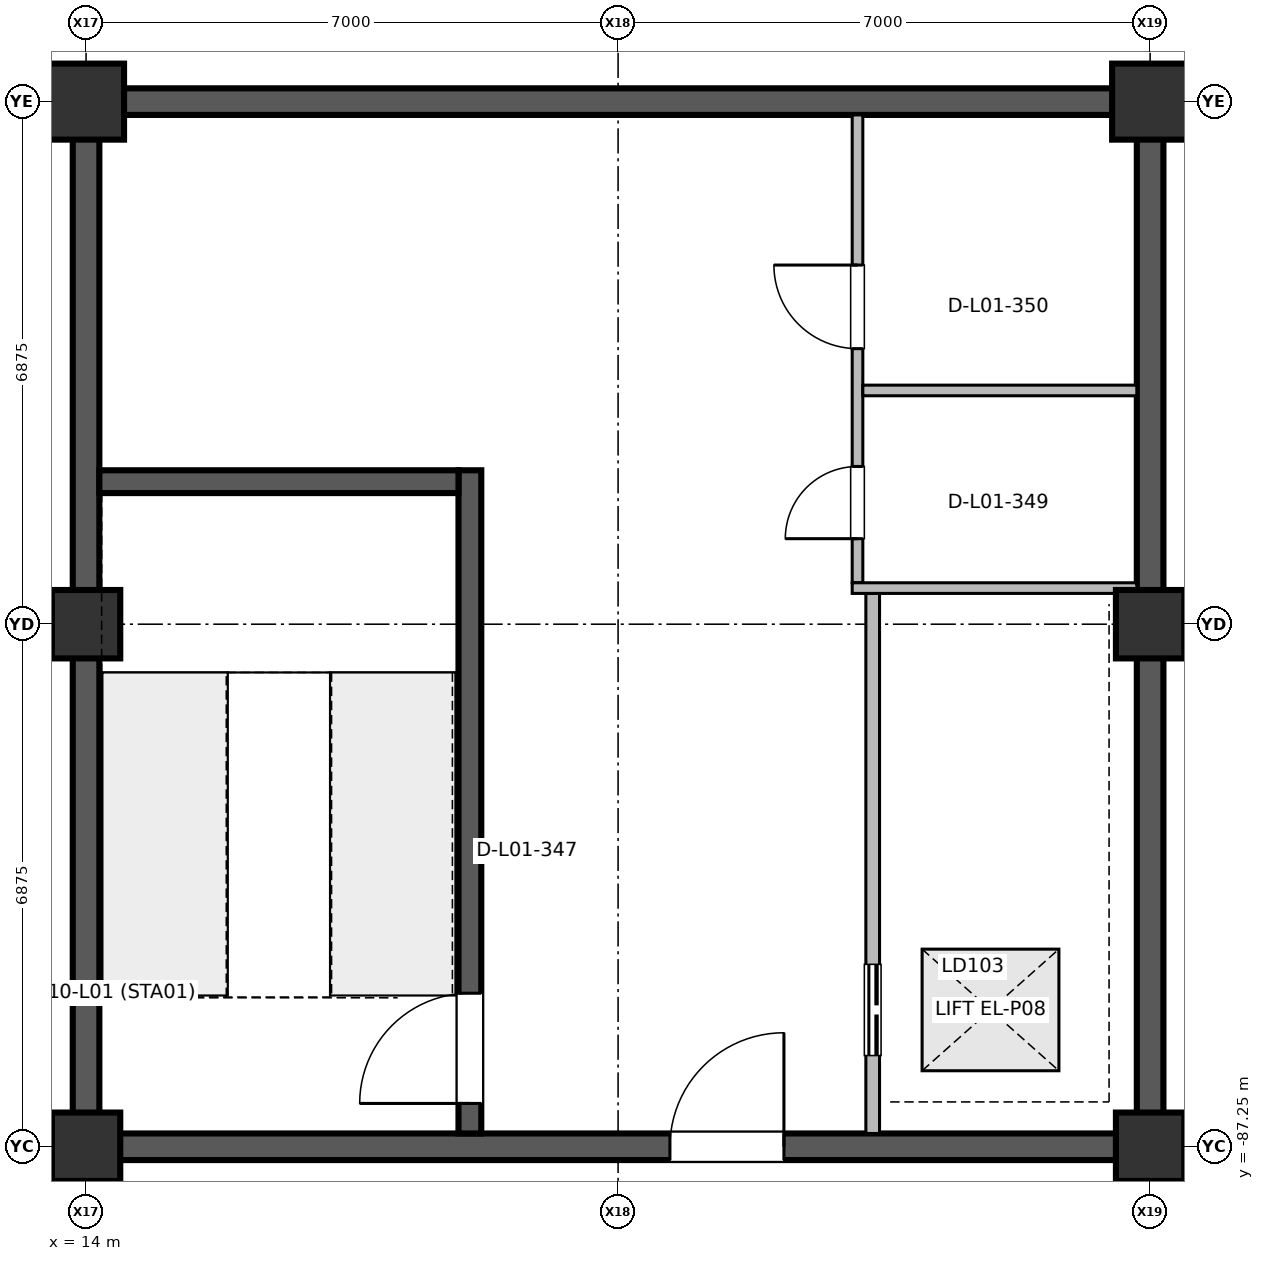
"""IFC4 building model, lengths in metres.
Left out: names, types, materials, properties, quantities, classifications, styles, units other than length and angle.
Written with IfcOpenShell. Run it as: python <this file> out.ifc"""

import sys

from ifc_helpers import new_model, si_unit, direction, frame, frame_2d, origin, origin_2d, place, context, subcontext, project, spatial, rectangle, extrude, element, fill, save


model = new_model("IFC4")
c1 = context("Model", 3, precision=1e-05, world=origin(), true_north=direction((0.0, 1.0)))
c2 = subcontext(c1, "Body", "Model", "MODEL_VIEW")
j1 = project(units=[si_unit("LENGTHUNIT", "METRE"), si_unit("PLANEANGLEUNIT", "RADIAN")], contexts=[c1])
p1 = place(None, origin())
s1 = spatial("IfcSite", under=j1, at=p1, CompositionType="ELEMENT")
p2 = place(p1, origin())
s2 = spatial("IfcBuilding", under=s1, at=p2, CompositionType="ELEMENT")
p3 = place(p2, origin())
s3 = spatial("IfcBuildingStorey", under=s2, at=p3, CompositionType="ELEMENT", Elevation=0.0)
for number, where, z_axis, x_axis in (
    (1, (14.0, -87.25, 0.0), (0.0, 0.0, 1.0), (1.0, 0.0, 0.0)),
    (2, (14.0, -80.375, 0.0), (0.0, 0.0, 1.0), (1.0, 0.0, 0.0)),
):
    element("IfcColumn", number, at=place(p3, frame(where, z_axis=z_axis, x_axis=x_axis)), inside=s3, PredefinedType="COLUMN", context=c2, shape_type="SweptSolid", body=[
        extrude(rectangle(XDim=0.9, YDim=0.9, at=origin_2d()), origin(), (0.0, 0.0, 1.0), 5.998),
    ])
p4 = place(p3, frame((14.0, -73.5, 0.0), z_axis=(0.0, 0.0, 1.0), x_axis=(1.0, 0.0, 0.0)))
e3 = element("IfcColumn", 3, at=p4, inside=s3, PredefinedType="COLUMN", context=c2, shape_type="SweptSolid", body=[
    extrude(rectangle(XDim=1.0, YDim=1.0, at=origin_2d()), origin(), (0.0, 0.0, 1.0), 5.998),
])
for number, where, z_axis, x_axis in (
    (4, (28.0, -87.25, 0.0), (0.0, 0.0, 1.0), (1.0, 0.0, 0.0)),
    (5, (28.0, -80.375, 0.0), (0.0, 0.0, 1.0), (1.0, 0.0, 0.0)),
):
    element("IfcColumn", number, at=place(p3, frame(where, z_axis=z_axis, x_axis=x_axis)), inside=s3, PredefinedType="COLUMN", context=c2, shape_type="SweptSolid", body=[
        extrude(rectangle(XDim=0.9, YDim=0.9, at=origin_2d()), origin(), (0.0, 0.0, 1.0), 5.998),
    ])
p5 = place(p3, frame((28.0, -73.5, 0.0), z_axis=(0.0, 0.0, 1.0), x_axis=(1.0, 0.0, 0.0)))
e6 = element("IfcColumn", 6, at=p5, inside=s3, PredefinedType="COLUMN", context=c2, shape_type="SweptSolid", body=[
    extrude(rectangle(XDim=1.0, YDim=1.0, at=origin_2d()), origin(), (0.0, 0.0, 1.0), 5.998),
])
for number, where, z_axis, x_axis in (
    (7, (14.0, -87.075, 0.0), (0.0, 0.0, 1.0), (0.0, 1.0, 0.0)),
    (8, (28.0, -87.075, 0.0), (0.0, 0.0, 1.0), (0.0, 1.0, 0.0)),
):
    element("IfcWall", number, at=place(p3, frame(where, z_axis=z_axis, x_axis=x_axis)), inside=s3, PredefinedType="SHEAR", context=c2, shape_type="SweptSolid", body=[
        extrude(rectangle(XDim=13.4, YDim=0.35, at=frame_2d((6.7, 0.0))), origin(), (0.0, 0.0, 1.0), 5.78),
    ])
p6 = place(p3, frame((14.175, -87.25, 0.0), z_axis=(0.0, 0.0, 1.0), x_axis=(1.0, 0.0, 0.0)))
e9 = element("IfcWall", 9, at=p6, inside=s3, PredefinedType="SHEAR", context=c2, shape_type="SweptSolid", body=[
    extrude(rectangle(XDim=13.65, YDim=0.35, at=frame_2d((6.825, 0.0))), origin(), (0.0, 0.0, 1.0), 5.78),
])
p7 = place(p6, frame((7.507, 0.0, 0.0)))
e10 = element("IfcOpeningElement", 10, at=p7, cuts=e9, PredefinedType="OPENING", context=c2, shape_type="SweptSolid", body=[
    extrude(rectangle(XDim=1.5, YDim=2.2, at=frame_2d((0.75, 1.1))), frame((0.0, 0.185, 0.0), z_axis=(0.0, -1.0, 0.0), x_axis=(1.0, 0.0, 0.0)), (0.0, 0.0, 1.0), 0.37),
])
p8 = place(p3, frame((14.175, -73.5, 0.0), z_axis=(0.0, 0.0, 1.0), x_axis=(1.0, 0.0, 0.0)))
e11 = element("IfcWall", 11, at=p8, inside=s3, PredefinedType="SHEAR", context=c2, shape_type="SweptSolid", body=[
    extrude(rectangle(XDim=13.65, YDim=0.35, at=frame_2d((6.825, 0.0))), origin(), (0.0, 0.0, 1.0), 5.78),
])
p9 = place(p3, frame((19.05, -87.075, 0.0), z_axis=(0.0, 0.0, 1.0), x_axis=(0.0, 1.0, 0.0)))
e12 = element("IfcWall", 12, at=p9, inside=s3, PredefinedType="SHEAR", context=c2, shape_type="SweptSolid", body=[
    extrude(rectangle(XDim=8.725, YDim=0.3, at=frame_2d((4.362, 0.0))), origin(), (0.0, 0.0, 1.0), 5.78),
])
p10 = place(p9, frame((0.395, 0.0, 0.0)))
e13 = element("IfcOpeningElement", 13, at=p10, cuts=e12, PredefinedType="OPENING", context=c2, shape_type="SweptSolid", body=[
    extrude(rectangle(XDim=1.45, YDim=2.2, at=frame_2d((0.725, 1.1))), frame((0.0, 0.16, 0.0), z_axis=(0.0, -1.0, 0.0), x_axis=(1.0, 0.0, 0.0)), (0.0, 0.0, 1.0), 0.32),
])
p11 = place(p3, frame((24.35, -87.075, 0.0), z_axis=(0.0, 0.0, 1.0), x_axis=(0.0, 1.0, 0.0)))
e14 = element("IfcWall", 14, at=p11, inside=s3, PredefinedType="PARTITIONING", context=c2, shape_type="SweptSolid", body=[
    extrude(rectangle(XDim=7.105, YDim=0.18, at=frame_2d((3.552, 0.0))), origin(), (0.0, 0.0, 1.0), 5.02),
])
p12 = place(p11, frame((1.025, 0.0, 0.0)))
e15 = element("IfcOpeningElement", 15, at=p12, cuts=e14, PredefinedType="OPENING", context=c2, shape_type="SweptSolid", body=[
    extrude(rectangle(XDim=1.2, YDim=2.25, at=frame_2d((0.6, 1.125))), frame((0.0, 0.1, 0.0), z_axis=(0.0, -1.0, 0.0), x_axis=(1.0, 0.0, 0.0)), (0.0, 0.0, 1.0), 0.2),
])
p13 = place(p3, frame((24.15, -79.83, 0.0), z_axis=(0.0, 0.0, 1.0), x_axis=(0.0, 1.0, 0.0)))
e16 = element("IfcWall", 16, at=p13, inside=s3, PredefinedType="PARTITIONING", context=c2, shape_type="SweptSolid", body=[
    extrude(rectangle(XDim=6.155, YDim=0.14, at=frame_2d((3.078, 0.0))), origin(), (0.0, 0.0, 1.0), 5.02),
])
p14 = place(p13, frame((0.58, 0.0, 0.0)))
e17 = element("IfcOpeningElement", 17, at=p14, cuts=e16, PredefinedType="OPENING", context=c2, shape_type="SweptSolid", body=[
    extrude(rectangle(XDim=0.95, YDim=2.15, at=frame_2d((0.475, 1.075))), frame((0.0, 0.08, 0.0), z_axis=(0.0, -1.0, 0.0), x_axis=(1.0, 0.0, 0.0)), (0.0, 0.0, 1.0), 0.16),
])
p15 = place(p13, frame((3.08, 0.0, 0.0)))
e18 = element("IfcOpeningElement", 18, at=p15, cuts=e16, PredefinedType="OPENING", context=c2, shape_type="SweptSolid", body=[
    extrude(rectangle(XDim=1.1, YDim=2.15, at=frame_2d((0.55, 1.075))), frame((0.0, 0.08, 0.0), z_axis=(0.0, -1.0, 0.0), x_axis=(1.0, 0.0, 0.0)), (0.0, 0.0, 1.0), 0.16),
])
p16 = place(p3, frame((24.08, -79.9, 0.0), z_axis=(0.0, 0.0, 1.0), x_axis=(1.0, 0.0, 0.0)))
e19 = element("IfcWall", 19, at=p16, inside=s3, PredefinedType="PARTITIONING", context=c2, shape_type="SweptSolid", body=[
    extrude(rectangle(XDim=3.745, YDim=0.14, at=frame_2d((1.873, 0.0))), origin(), (0.0, 0.0, 1.0), 5.02),
])
p17 = place(p3, frame((24.22, -77.3, 0.0), z_axis=(0.0, 0.0, 1.0), x_axis=(1.0, 0.0, 0.0)))
e20 = element("IfcWall", 20, at=p17, inside=s3, PredefinedType="PARTITIONING", context=c2, shape_type="SweptSolid", body=[
    extrude(rectangle(XDim=3.605, YDim=0.14, at=frame_2d((1.802, 0.0))), origin(), (0.0, 0.0, 1.0), 5.02),
])
p18 = place(p3, frame((14.175, -78.5, 0.0), z_axis=(0.0, 0.0, 1.0), x_axis=(1.0, 0.0, 0.0)))
e21 = element("IfcWall", 21, at=p18, inside=s3, PredefinedType="SHEAR", context=c2, shape_type="SweptSolid", body=[
    extrude(rectangle(XDim=4.725, YDim=0.3, at=frame_2d((2.362, 0.0))), origin(), (0.0, 0.0, 1.0), 5.78),
])
p19 = place(p7, origin())
e22 = element("IfcDoor", 22, at=p19, inside=s3, OperationType="SINGLE_SWING_RIGHT", PredefinedType="DOOR", context=c2, shape_type="SweptSolid", body=[
    extrude(rectangle(XDim=1.5, YDim=2.2, at=frame_2d((0.75, 1.1))), frame((0.0, 0.025, 0.0), z_axis=(0.0, -1.0, 0.0), x_axis=(1.0, 0.0, 0.0)), (0.0, 0.0, 1.0), 0.05),
])
fill(e10, e22)
p20 = place(p10, origin())
e23 = element("IfcDoor", 23, at=p20, inside=s3, OperationType="SINGLE_SWING_LEFT", PredefinedType="DOOR", context=c2, shape_type="SweptSolid", body=[
    extrude(rectangle(XDim=1.45, YDim=2.2, at=frame_2d((0.725, 1.1))), frame((0.0, 0.025, 0.0), z_axis=(0.0, -1.0, 0.0), x_axis=(1.0, 0.0, 0.0)), (0.0, 0.0, 1.0), 0.05),
])
fill(e13, e23)
p21 = place(p12, origin())
e24 = element("IfcDoor", 24, at=p21, inside=s3, OperationType="DOUBLE_DOOR_SLIDING", PredefinedType="DOOR", context=c2, shape_type="SweptSolid", body=[
    extrude(rectangle(XDim=1.2, YDim=2.25, at=frame_2d((0.6, 1.125))), frame((0.0, 0.025, 0.0), z_axis=(0.0, -1.0, 0.0), x_axis=(1.0, 0.0, 0.0)), (0.0, 0.0, 1.0), 0.05),
])
fill(e15, e24)
p22 = place(p14, origin())
e25 = element("IfcDoor", 25, at=p22, inside=s3, OperationType="SINGLE_SWING_LEFT", PredefinedType="DOOR", context=c2, shape_type="SweptSolid", body=[
    extrude(rectangle(XDim=0.95, YDim=2.15, at=frame_2d((0.475, 1.075))), frame((0.0, 0.025, 0.0), z_axis=(0.0, -1.0, 0.0), x_axis=(1.0, 0.0, 0.0)), (0.0, 0.0, 1.0), 0.05),
])
fill(e17, e25)
p23 = place(p15, origin())
e26 = element("IfcDoor", 26, at=p23, inside=s3, OperationType="SINGLE_SWING_RIGHT", PredefinedType="DOOR", context=c2, shape_type="SweptSolid", body=[
    extrude(rectangle(XDim=1.1, YDim=2.15, at=frame_2d((0.55, 1.075))), frame((0.0, 0.025, 0.0), z_axis=(0.0, -1.0, 0.0), x_axis=(1.0, 0.0, 0.0)), (0.0, 0.0, 1.0), 0.05),
])
fill(e18, e26)
save(model, sys.argv[1])
